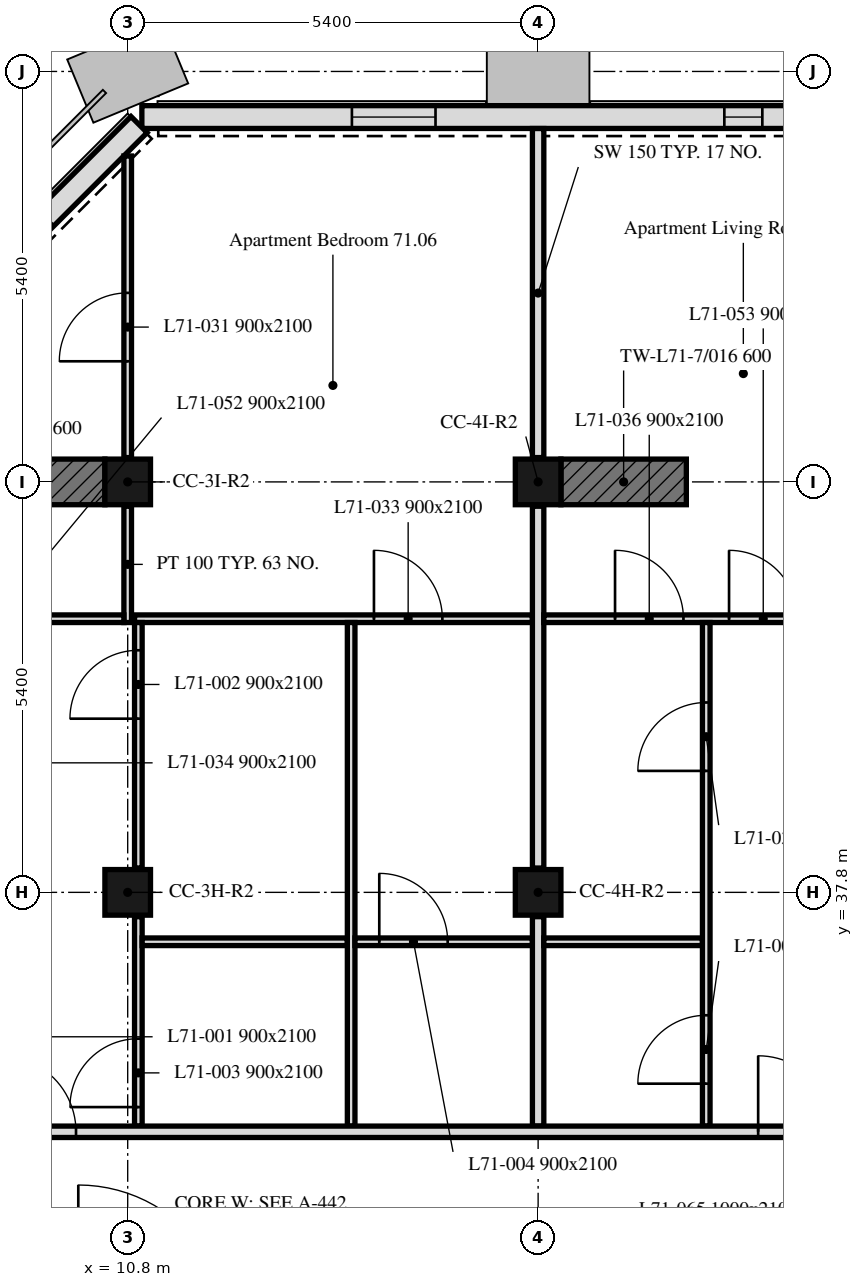
"""IFC4 building model, lengths in metres.
Left out: names, types, materials, properties, quantities, classifications, styles, units other than length and angle.
Written with IfcOpenShell. Run it as: python <this file> out.ifc"""

import sys

from ifc_helpers import new_model, si_unit, direction, frame, frame_2d, origin, origin_2d, place, context, subcontext, project, spatial, rectangle, extrude, element, fill, save


model = new_model("IFC4")
c1 = context("Model", 3, precision=1e-05, world=origin(), true_north=direction((0.0, 1.0)))
c2 = subcontext(c1, "Body", "Model", "MODEL_VIEW")
j1 = project(units=[si_unit("LENGTHUNIT", "METRE"), si_unit("PLANEANGLEUNIT", "RADIAN")], contexts=[c1])
p1 = place(None, origin())
s1 = spatial("IfcSite", under=j1, at=p1, CompositionType="ELEMENT")
p2 = place(p1, origin())
s2 = spatial("IfcBuilding", under=s1, at=p2, CompositionType="ELEMENT")
p3 = place(p2, frame((0.0, 0.0, 288.4)))
s3 = spatial("IfcBuildingStorey", under=s2, at=p3, CompositionType="ELEMENT", Elevation=288.4)
for number, where, z_axis, x_axis in (
    (1, (10.8, 37.8, 0.0), (0.0, 0.0, 1.0), (1.0, 0.0, 0.0)),
    (2, (16.2, 37.8, 0.0), (0.0, 0.0, 1.0), (1.0, 0.0, 0.0)),
    (3, (10.8, 43.2, 0.0), (0.0, 0.0, 1.0), (1.0, 0.0, 0.0)),
    (4, (16.2, 43.2, 0.0), (0.0, 0.0, 1.0), (1.0, 0.0, 0.0)),
):
    element("IfcColumn", number, at=place(p3, frame(where, z_axis=z_axis, x_axis=x_axis)), inside=s3, PredefinedType="COLUMN", context=c2, shape_type="SweptSolid", body=[
        extrude(rectangle(XDim=0.6, YDim=0.6, at=origin_2d()), origin(), (0.0, 0.0, 1.0), 3.0),
    ])
p4 = place(p3, frame((8.7, 43.2, 0.0), z_axis=(0.0, 0.0, 1.0), x_axis=(1.0, 0.0, 0.0)))
e5 = element("IfcWall", 5, at=p4, inside=s3, PredefinedType="SHEAR", context=c2, shape_type="SweptSolid", body=[
    extrude(rectangle(XDim=1.8, YDim=0.6, at=frame_2d((0.9, 0.0))), origin(), (0.0, 0.0, 1.0), 3.0),
])
p5 = place(p3, frame((16.5, 43.2, 0.0), z_axis=(0.0, 0.0, 1.0), x_axis=(1.0, 0.0, 0.0)))
e6 = element("IfcWall", 6, at=p5, inside=s3, PredefinedType="SHEAR", context=c2, shape_type="SweptSolid", body=[
    extrude(rectangle(XDim=1.65, YDim=0.6, at=frame_2d((0.825, 0.0))), origin(), (0.0, 0.0, 1.0), 3.0),
])
p6 = place(p3, frame((43.014, 48.0, 0.0), z_axis=(0.0, 0.0, 1.0), x_axis=(-1.0, 0.0, 0.0)))
e7 = element("IfcWall", 7, at=p6, inside=s3, PredefinedType="SOLIDWALL", context=c2, shape_type="SweptSolid", body=[
    extrude(rectangle(XDim=32.027, YDim=0.3, at=frame_2d((16.014, 0.0))), origin(), (0.0, 0.0, 1.0), 3.0),
])
p7 = place(p6, frame((0.814, 0.0, 0.9)))
e8 = element("IfcOpeningElement", 8, at=p7, cuts=e7, PredefinedType="OPENING", context=c2, shape_type="SweptSolid", body=[
    extrude(rectangle(XDim=3.4, YDim=1.7, at=frame_2d((1.7, 0.85))), frame((0.0, 0.16, 0.0), z_axis=(0.0, -1.0, 0.0), x_axis=(1.0, 0.0, 0.0)), (0.0, 0.0, 1.0), 0.32),
])
p8 = place(p6, frame((7.664, 0.0, 0.9)))
e9 = element("IfcOpeningElement", 9, at=p8, cuts=e7, PredefinedType="OPENING", context=c2, shape_type="SweptSolid", body=[
    extrude(rectangle(XDim=0.5, YDim=1.7, at=frame_2d((0.25, 0.85))), frame((0.0, 0.16, 0.0), z_axis=(0.0, -1.0, 0.0), x_axis=(1.0, 0.0, 0.0)), (0.0, 0.0, 1.0), 0.32),
])
p9 = place(p6, frame((13.064, 0.0, 0.9)))
e10 = element("IfcOpeningElement", 10, at=p9, cuts=e7, PredefinedType="OPENING", context=c2, shape_type="SweptSolid", body=[
    extrude(rectangle(XDim=0.5, YDim=1.7, at=frame_2d((0.25, 0.85))), frame((0.0, 0.16, 0.0), z_axis=(0.0, -1.0, 0.0), x_axis=(1.0, 0.0, 0.0)), (0.0, 0.0, 1.0), 0.32),
])
p10 = place(p6, frame((18.464, 0.0, 0.9)))
e11 = element("IfcOpeningElement", 11, at=p10, cuts=e7, PredefinedType="OPENING", context=c2, shape_type="SweptSolid", body=[
    extrude(rectangle(XDim=0.5, YDim=1.7, at=frame_2d((0.25, 0.85))), frame((0.0, 0.16, 0.0), z_axis=(0.0, -1.0, 0.0), x_axis=(1.0, 0.0, 0.0)), (0.0, 0.0, 1.0), 0.32),
])
p11 = place(p6, frame((23.864, 0.0, 0.9)))
e12 = element("IfcOpeningElement", 12, at=p11, cuts=e7, PredefinedType="OPENING", context=c2, shape_type="SweptSolid", body=[
    extrude(rectangle(XDim=0.5, YDim=1.7, at=frame_2d((0.25, 0.85))), frame((0.0, 0.16, 0.0), z_axis=(0.0, -1.0, 0.0), x_axis=(1.0, 0.0, 0.0)), (0.0, 0.0, 1.0), 0.32),
])
p12 = place(p6, frame((28.164, 0.0, 0.9)))
e13 = element("IfcOpeningElement", 13, at=p12, cuts=e7, PredefinedType="OPENING", context=c2, shape_type="SweptSolid", body=[
    extrude(rectangle(XDim=1.1, YDim=1.7, at=frame_2d((0.55, 0.85))), frame((0.0, 0.16, 0.0), z_axis=(0.0, -1.0, 0.0), x_axis=(1.0, 0.0, 0.0)), (0.0, 0.0, 1.0), 0.32),
])
p13 = place(p3, frame((10.949, 47.901, 0.0), z_axis=(0.0, 0.0, 1.0), x_axis=(-0.707106781187, -0.707106781187, 0.0)))
e14 = element("IfcWall", 14, at=p13, inside=s3, PredefinedType="SOLIDWALL", context=c2, shape_type="SweptSolid", body=[
    extrude(rectangle(XDim=6.86, YDim=0.3, at=frame_2d((3.43, 0.0))), origin(), (0.0, 0.0, 1.0), 3.0),
])
p14 = place(p13, frame((1.73, 0.0, 0.9)))
e15 = element("IfcOpeningElement", 15, at=p14, cuts=e14, PredefinedType="OPENING", context=c2, shape_type="SweptSolid", body=[
    extrude(rectangle(XDim=3.4, YDim=1.7, at=frame_2d((1.7, 0.85))), frame((0.0, 0.16, 0.0), z_axis=(0.0, -1.0, 0.0), x_axis=(1.0, 0.0, 0.0)), (0.0, 0.0, 1.0), 0.32),
])
p15 = place(p3, frame((10.8, 41.35, 0.0), z_axis=(0.0, 0.0, 1.0), x_axis=(0.0, 1.0, 0.0)))
e16 = element("IfcWall", 16, at=p15, inside=s3, PredefinedType="PARTITIONING", context=c2, shape_type="SweptSolid", body=[
    extrude(rectangle(XDim=1.53, YDim=0.1, at=frame_2d((0.765, 0.0))), origin(), (0.0, 0.0, 1.0), 3.0),
])
p16 = place(p3, frame((10.8, 43.52, 0.0), z_axis=(0.0, 0.0, 1.0), x_axis=(0.0, 1.0, 0.0)))
e17 = element("IfcWall", 17, at=p16, inside=s3, PredefinedType="PARTITIONING", context=c2, shape_type="SweptSolid", body=[
    extrude(rectangle(XDim=3.968, YDim=0.1, at=frame_2d((1.984, 0.0))), origin(), (0.0, 0.0, 1.0), 3.0),
])
p17 = place(p16, frame((1.267, 0.0, 0.0)))
e18 = element("IfcOpeningElement", 18, at=p17, cuts=e17, PredefinedType="OPENING", context=c2, shape_type="SweptSolid", body=[
    extrude(rectangle(XDim=0.9, YDim=2.1, at=frame_2d((0.45, 1.05))), frame((0.0, 0.05, 0.0), z_axis=(0.0, -1.0, 0.0), x_axis=(1.0, 0.0, 0.0)), (0.0, 0.0, 1.0), 0.1),
])
p18 = place(p3, frame((6.151, 41.4, 0.0), z_axis=(0.0, 0.0, 1.0), x_axis=(1.0, 0.0, 0.0)))
e19 = element("IfcWall", 19, at=p18, inside=s3, PredefinedType="PARTITIONING", context=c2, shape_type="SweptSolid", body=[
    extrude(rectangle(XDim=4.599, YDim=0.1, at=frame_2d((2.3, 0.0))), origin(), (0.0, 0.0, 1.0), 3.0),
])
p19 = place(p18, frame((1.079, 0.0, 0.0)))
e20 = element("IfcOpeningElement", 20, at=p19, cuts=e19, PredefinedType="OPENING", context=c2, shape_type="SweptSolid", body=[
    extrude(rectangle(XDim=0.9, YDim=2.1, at=frame_2d((0.45, 1.05))), frame((0.0, 0.05, 0.0), z_axis=(0.0, -1.0, 0.0), x_axis=(1.0, 0.0, 0.0)), (0.0, 0.0, 1.0), 0.1),
])
p20 = place(p18, frame((2.449, 0.0, 0.0)))
e21 = element("IfcOpeningElement", 21, at=p20, cuts=e19, PredefinedType="OPENING", context=c2, shape_type="SweptSolid", body=[
    extrude(rectangle(XDim=0.9, YDim=2.1, at=frame_2d((0.45, 1.05))), frame((0.0, 0.05, 0.0), z_axis=(0.0, -1.0, 0.0), x_axis=(1.0, 0.0, 0.0)), (0.0, 0.0, 1.0), 0.1),
])
p21 = place(p3, frame((16.2, 43.52, 0.0), z_axis=(0.0, 0.0, 1.0), x_axis=(0.0, 1.0, 0.0)))
e22 = element("IfcWall", 22, at=p21, inside=s3, PredefinedType="PARTITIONING", context=c2, shape_type="SweptSolid", body=[
    extrude(rectangle(XDim=4.329, YDim=0.15, at=frame_2d((2.165, 0.0))), origin(), (0.0, 0.0, 1.0), 2.4),
])
p22 = place(p3, frame((10.89, 41.4, 0.0), z_axis=(0.0, 0.0, 1.0), x_axis=(1.0, 0.0, 0.0)))
e23 = element("IfcWall", 23, at=p22, inside=s3, PredefinedType="PARTITIONING", context=c2, shape_type="SweptSolid", body=[
    extrude(rectangle(XDim=5.235, YDim=0.1, at=frame_2d((2.618, 0.0))), origin(), (0.0, 0.0, 1.0), 3.0),
])
p23 = place(p22, frame((3.15, 0.0, 0.0)))
e24 = element("IfcOpeningElement", 24, at=p23, cuts=e23, PredefinedType="OPENING", context=c2, shape_type="SweptSolid", body=[
    extrude(rectangle(XDim=0.9, YDim=2.1, at=frame_2d((0.45, 1.05))), frame((0.0, 0.05, 0.0), z_axis=(0.0, -1.0, 0.0), x_axis=(1.0, 0.0, 0.0)), (0.0, 0.0, 1.0), 0.1),
])
p24 = place(p3, frame((10.94, 34.725, 0.0), z_axis=(0.0, 0.0, 1.0), x_axis=(0.0, 1.0, 0.0)))
e25 = element("IfcWall", 25, at=p24, inside=s3, PredefinedType="PARTITIONING", context=c2, shape_type="SweptSolid", body=[
    extrude(rectangle(XDim=2.755, YDim=0.1, at=frame_2d((1.377, 0.0))), origin(), (0.0, 0.0, 1.0), 3.0),
])
p25 = place(p24, frame((0.25, 0.0, 0.0)))
e26 = element("IfcOpeningElement", 26, at=p25, cuts=e25, PredefinedType="OPENING", context=c2, shape_type="SweptSolid", body=[
    extrude(rectangle(XDim=0.9, YDim=2.1, at=frame_2d((0.45, 1.05))), frame((0.0, 0.05, 0.0), z_axis=(0.0, -1.0, 0.0), x_axis=(1.0, 0.0, 0.0)), (0.0, 0.0, 1.0), 0.1),
])
p26 = place(p3, frame((10.94, 38.12, 0.0), z_axis=(0.0, 0.0, 1.0), x_axis=(0.0, 1.0, 0.0)))
e27 = element("IfcWall", 27, at=p26, inside=s3, PredefinedType="PARTITIONING", context=c2, shape_type="SweptSolid", body=[
    extrude(rectangle(XDim=3.23, YDim=0.1, at=frame_2d((1.615, 0.0))), origin(), (0.0, 0.0, 1.0), 3.0),
])
p27 = place(p26, frame((1.965, 0.0, 0.0)))
e28 = element("IfcOpeningElement", 28, at=p27, cuts=e27, PredefinedType="OPENING", context=c2, shape_type="SweptSolid", body=[
    extrude(rectangle(XDim=0.9, YDim=2.1, at=frame_2d((0.45, 1.05))), frame((0.0, 0.05, 0.0), z_axis=(0.0, -1.0, 0.0), x_axis=(1.0, 0.0, 0.0)), (0.0, 0.0, 1.0), 0.1),
])
p28 = place(p3, frame((10.99, 37.15, 0.0), z_axis=(0.0, 0.0, 1.0), x_axis=(1.0, 0.0, 0.0)))
e29 = element("IfcWall", 29, at=p28, inside=s3, PredefinedType="PARTITIONING", context=c2, shape_type="SweptSolid", body=[
    extrude(rectangle(XDim=2.7, YDim=0.1, at=frame_2d((1.35, 0.0))), origin(), (0.0, 0.0, 1.0), 3.0),
])
p29 = place(p3, frame((13.74, 34.725, 0.0), z_axis=(0.0, 0.0, 1.0), x_axis=(0.0, 1.0, 0.0)))
e30 = element("IfcWall", 30, at=p29, inside=s3, PredefinedType="PARTITIONING", context=c2, shape_type="SweptSolid", body=[
    extrude(rectangle(XDim=6.625, YDim=0.1, at=frame_2d((3.312, 0.0))), origin(), (0.0, 0.0, 1.0), 3.0),
])
p30 = place(p3, frame((16.2, 38.12, 0.0), z_axis=(0.0, 0.0, 1.0), x_axis=(0.0, 1.0, 0.0)))
e31 = element("IfcWall", 31, at=p30, inside=s3, PredefinedType="PARTITIONING", context=c2, shape_type="SweptSolid", body=[
    extrude(rectangle(XDim=4.76, YDim=0.15, at=frame_2d((2.38, 0.0))), origin(), (0.0, 0.0, 1.0), 2.4),
])
p31 = place(p3, frame((13.79, 37.15, 0.0), z_axis=(0.0, 0.0, 1.0), x_axis=(1.0, 0.0, 0.0)))
e32 = element("IfcWall", 32, at=p31, inside=s3, PredefinedType="PARTITIONING", context=c2, shape_type="SweptSolid", body=[
    extrude(rectangle(XDim=2.335, YDim=0.1, at=frame_2d((1.167, 0.0))), origin(), (0.0, 0.0, 1.0), 3.0),
])
p32 = place(p31, frame((0.32, 0.0, 0.0)))
e33 = element("IfcOpeningElement", 33, at=p32, cuts=e32, PredefinedType="OPENING", context=c2, shape_type="SweptSolid", body=[
    extrude(rectangle(XDim=0.9, YDim=2.1, at=frame_2d((0.45, 1.05))), frame((0.0, 0.05, 0.0), z_axis=(0.0, -1.0, 0.0), x_axis=(1.0, 0.0, 0.0)), (0.0, 0.0, 1.0), 0.1),
])
p33 = place(p3, frame((16.2, 34.725, 0.0), z_axis=(0.0, 0.0, 1.0), x_axis=(0.0, 1.0, 0.0)))
e34 = element("IfcWall", 34, at=p33, inside=s3, PredefinedType="PARTITIONING", context=c2, shape_type="SweptSolid", body=[
    extrude(rectangle(XDim=2.755, YDim=0.15, at=frame_2d((1.377, 0.0))), origin(), (0.0, 0.0, 1.0), 2.4),
])
p34 = place(p3, frame((16.275, 41.4, 0.0), z_axis=(0.0, 0.0, 1.0), x_axis=(1.0, 0.0, 0.0)))
e35 = element("IfcWall", 35, at=p34, inside=s3, PredefinedType="PARTITIONING", context=c2, shape_type="SweptSolid", body=[
    extrude(rectangle(XDim=10.65, YDim=0.1, at=frame_2d((5.325, 0.0))), origin(), (0.0, 0.0, 1.0), 2.4),
])
p35 = place(p34, frame((0.937, 0.0, 0.0)))
e36 = element("IfcOpeningElement", 36, at=p35, cuts=e35, PredefinedType="OPENING", context=c2, shape_type="SweptSolid", body=[
    extrude(rectangle(XDim=0.9, YDim=2.1, at=frame_2d((0.45, 1.05))), frame((0.0, 0.05, 0.0), z_axis=(0.0, -1.0, 0.0), x_axis=(1.0, 0.0, 0.0)), (0.0, 0.0, 1.0), 0.1),
])
p36 = place(p34, frame((8.075, 0.0, 0.0)))
e37 = element("IfcOpeningElement", 37, at=p36, cuts=e35, PredefinedType="OPENING", context=c2, shape_type="SweptSolid", body=[
    extrude(rectangle(XDim=0.9, YDim=2.1, at=frame_2d((0.45, 1.05))), frame((0.0, 0.05, 0.0), z_axis=(0.0, -1.0, 0.0), x_axis=(1.0, 0.0, 0.0)), (0.0, 0.0, 1.0), 0.1),
])
p37 = place(p34, frame((2.437, 0.0, 0.0)))
e38 = element("IfcOpeningElement", 38, at=p37, cuts=e35, PredefinedType="OPENING", context=c2, shape_type="SweptSolid", body=[
    extrude(rectangle(XDim=0.9, YDim=2.1, at=frame_2d((0.45, 1.05))), frame((0.0, 0.05, 0.0), z_axis=(0.0, -1.0, 0.0), x_axis=(1.0, 0.0, 0.0)), (0.0, 0.0, 1.0), 0.1),
])
p38 = place(p3, frame((16.275, 37.15, 0.0), z_axis=(0.0, 0.0, 1.0), x_axis=(1.0, 0.0, 0.0)))
e39 = element("IfcWall", 39, at=p38, inside=s3, PredefinedType="PARTITIONING", context=c2, shape_type="SweptSolid", body=[
    extrude(rectangle(XDim=2.087, YDim=0.1, at=frame_2d((1.043, 0.0))), origin(), (0.0, 0.0, 1.0), 3.0),
])
p39 = place(p3, frame((18.412, 34.725, 0.0), z_axis=(0.0, 0.0, 1.0), x_axis=(0.0, 1.0, 0.0)))
e40 = element("IfcWall", 40, at=p39, inside=s3, PredefinedType="PARTITIONING", context=c2, shape_type="SweptSolid", body=[
    extrude(rectangle(XDim=6.625, YDim=0.1, at=frame_2d((3.312, 0.0))), origin(), (0.0, 0.0, 1.0), 3.0),
])
p40 = place(p39, frame((0.558, 0.0, 0.0)))
e41 = element("IfcOpeningElement", 41, at=p40, cuts=e40, PredefinedType="OPENING", context=c2, shape_type="SweptSolid", body=[
    extrude(rectangle(XDim=0.9, YDim=2.1, at=frame_2d((0.45, 1.05))), frame((0.0, 0.05, 0.0), z_axis=(0.0, -1.0, 0.0), x_axis=(1.0, 0.0, 0.0)), (0.0, 0.0, 1.0), 0.1),
])
p41 = place(p39, frame((4.673, 0.0, 0.0)))
e42 = element("IfcOpeningElement", 42, at=p41, cuts=e40, PredefinedType="OPENING", context=c2, shape_type="SweptSolid", body=[
    extrude(rectangle(XDim=0.9, YDim=2.1, at=frame_2d((0.45, 1.05))), frame((0.0, 0.05, 0.0), z_axis=(0.0, -1.0, 0.0), x_axis=(1.0, 0.0, 0.0)), (0.0, 0.0, 1.0), 0.1),
])
p42 = place(p3, frame((6.151, 34.65, 0.0), z_axis=(0.0, 0.0, 1.0), x_axis=(1.0, 0.0, 0.0)))
e43 = element("IfcWall", 43, at=p42, inside=s3, PredefinedType="PARTITIONING", context=c2, shape_type="SweptSolid", body=[
    extrude(rectangle(XDim=41.698, YDim=0.15, at=frame_2d((20.849, 0.0))), origin(), (0.0, 0.0, 1.0), 2.4),
])
p43 = place(p42, frame((2.969, 0.0, 0.0)))
e44 = element("IfcOpeningElement", 44, at=p43, cuts=e43, PredefinedType="OPENING", context=c2, shape_type="SweptSolid", body=[
    extrude(rectangle(XDim=1.0, YDim=2.1, at=frame_2d((0.5, 1.05))), frame((0.0, 0.075, 0.0), z_axis=(0.0, -1.0, 0.0), x_axis=(1.0, 0.0, 0.0)), (0.0, 0.0, 1.0), 0.15),
])
p44 = place(p42, frame((12.944, 0.0, 0.0)))
e45 = element("IfcOpeningElement", 45, at=p44, cuts=e43, PredefinedType="OPENING", context=c2, shape_type="SweptSolid", body=[
    extrude(rectangle(XDim=1.0, YDim=2.1, at=frame_2d((0.5, 1.05))), frame((0.0, 0.075, 0.0), z_axis=(0.0, -1.0, 0.0), x_axis=(1.0, 0.0, 0.0)), (0.0, 0.0, 1.0), 0.15),
])
p45 = place(p42, frame((24.444, 0.0, 0.0)))
e46 = element("IfcOpeningElement", 46, at=p45, cuts=e43, PredefinedType="OPENING", context=c2, shape_type="SweptSolid", body=[
    extrude(rectangle(XDim=1.0, YDim=2.1, at=frame_2d((0.5, 1.05))), frame((0.0, 0.075, 0.0), z_axis=(0.0, -1.0, 0.0), x_axis=(1.0, 0.0, 0.0)), (0.0, 0.0, 1.0), 0.15),
])
p46 = place(p42, frame((34.964, 0.0, 0.0)))
e47 = element("IfcOpeningElement", 47, at=p46, cuts=e43, PredefinedType="OPENING", context=c2, shape_type="SweptSolid", body=[
    extrude(rectangle(XDim=1.0, YDim=2.1, at=frame_2d((0.5, 1.05))), frame((0.0, 0.075, 0.0), z_axis=(0.0, -1.0, 0.0), x_axis=(1.0, 0.0, 0.0)), (0.0, 0.0, 1.0), 0.15),
])
p47 = place(p11, origin())
e48 = element("IfcWindow", 48, at=p47, inside=s3, PartitioningType="SINGLE_PANEL", PredefinedType="WINDOW", context=c2, shape_type="SweptSolid", body=[
    extrude(rectangle(XDim=0.5, YDim=1.7, at=frame_2d((0.25, 0.85))), frame((0.0, 0.03, 0.0), z_axis=(0.0, -1.0, 0.0), x_axis=(1.0, 0.0, 0.0)), (0.0, 0.0, 1.0), 0.06),
])
fill(e12, e48)
p48 = place(p12, origin())
e49 = element("IfcWindow", 49, at=p48, inside=s3, PartitioningType="SINGLE_PANEL", PredefinedType="WINDOW", context=c2, shape_type="SweptSolid", body=[
    extrude(rectangle(XDim=1.1, YDim=1.7, at=frame_2d((0.55, 0.85))), frame((0.0, 0.03, 0.0), z_axis=(0.0, -1.0, 0.0), x_axis=(1.0, 0.0, 0.0)), (0.0, 0.0, 1.0), 0.06),
])
fill(e13, e49)
p49 = place(p27, origin())
e50 = element("IfcDoor", 50, at=p49, inside=s3, OperationType="SINGLE_SWING_RIGHT", PredefinedType="DOOR", context=c2, shape_type="SweptSolid", body=[
    extrude(rectangle(XDim=0.9, YDim=2.1, at=frame_2d((0.45, 1.05))), frame((0.0, 0.025, 0.0), z_axis=(0.0, -1.0, 0.0), x_axis=(1.0, 0.0, 0.0)), (0.0, 0.0, 1.0), 0.05),
])
fill(e28, e50)
p50 = place(p25, origin())
e51 = element("IfcDoor", 51, at=p50, inside=s3, OperationType="SINGLE_SWING_RIGHT", PredefinedType="DOOR", context=c2, shape_type="SweptSolid", body=[
    extrude(rectangle(XDim=0.9, YDim=2.1, at=frame_2d((0.45, 1.05))), frame((0.0, 0.025, 0.0), z_axis=(0.0, -1.0, 0.0), x_axis=(1.0, 0.0, 0.0)), (0.0, 0.0, 1.0), 0.05),
])
fill(e26, e51)
p51 = place(p32, origin())
e52 = element("IfcDoor", 52, at=p51, inside=s3, OperationType="SINGLE_SWING_RIGHT", PredefinedType="DOOR", context=c2, shape_type="SweptSolid", body=[
    extrude(rectangle(XDim=0.9, YDim=2.1, at=frame_2d((0.45, 1.05))), frame((0.0, 0.025, 0.0), z_axis=(0.0, -1.0, 0.0), x_axis=(1.0, 0.0, 0.0)), (0.0, 0.0, 1.0), 0.05),
])
fill(e33, e52)
p52 = place(p40, origin())
e53 = element("IfcDoor", 53, at=p52, inside=s3, OperationType="SINGLE_SWING_RIGHT", PredefinedType="DOOR", context=c2, shape_type="SweptSolid", body=[
    extrude(rectangle(XDim=0.9, YDim=2.1, at=frame_2d((0.45, 1.05))), frame((0.0, 0.025, 0.0), z_axis=(0.0, -1.0, 0.0), x_axis=(1.0, 0.0, 0.0)), (0.0, 0.0, 1.0), 0.05),
])
fill(e41, e53)
p53 = place(p17, origin())
e54 = element("IfcDoor", 54, at=p53, inside=s3, OperationType="SINGLE_SWING_RIGHT", PredefinedType="DOOR", context=c2, shape_type="SweptSolid", body=[
    extrude(rectangle(XDim=0.9, YDim=2.1, at=frame_2d((0.45, 1.05))), frame((0.0, 0.025, 0.0), z_axis=(0.0, -1.0, 0.0), x_axis=(1.0, 0.0, 0.0)), (0.0, 0.0, 1.0), 0.05),
])
fill(e18, e54)
p54 = place(p23, origin())
e55 = element("IfcDoor", 55, at=p54, inside=s3, OperationType="SINGLE_SWING_LEFT", PredefinedType="DOOR", context=c2, shape_type="SweptSolid", body=[
    extrude(rectangle(XDim=0.9, YDim=2.1, at=frame_2d((0.45, 1.05))), frame((0.0, 0.025, 0.0), z_axis=(0.0, -1.0, 0.0), x_axis=(1.0, 0.0, 0.0)), (0.0, 0.0, 1.0), 0.05),
])
fill(e24, e55)
p55 = place(p35, origin())
e56 = element("IfcDoor", 56, at=p55, inside=s3, OperationType="SINGLE_SWING_RIGHT", PredefinedType="DOOR", context=c2, shape_type="SweptSolid", body=[
    extrude(rectangle(XDim=0.9, YDim=2.1, at=frame_2d((0.45, 1.05))), frame((0.0, 0.025, 0.0), z_axis=(0.0, -1.0, 0.0), x_axis=(1.0, 0.0, 0.0)), (0.0, 0.0, 1.0), 0.05),
])
fill(e36, e56)
p56 = place(p41, origin())
e57 = element("IfcDoor", 57, at=p56, inside=s3, OperationType="SINGLE_SWING_LEFT", PredefinedType="DOOR", context=c2, shape_type="SweptSolid", body=[
    extrude(rectangle(XDim=0.9, YDim=2.1, at=frame_2d((0.45, 1.05))), frame((0.0, 0.025, 0.0), z_axis=(0.0, -1.0, 0.0), x_axis=(1.0, 0.0, 0.0)), (0.0, 0.0, 1.0), 0.05),
])
fill(e42, e57)
p57 = place(p37, origin())
e58 = element("IfcDoor", 58, at=p57, inside=s3, OperationType="SINGLE_SWING_LEFT", PredefinedType="DOOR", context=c2, shape_type="SweptSolid", body=[
    extrude(rectangle(XDim=0.9, YDim=2.1, at=frame_2d((0.45, 1.05))), frame((0.0, 0.025, 0.0), z_axis=(0.0, -1.0, 0.0), x_axis=(1.0, 0.0, 0.0)), (0.0, 0.0, 1.0), 0.05),
])
fill(e38, e58)
p58 = place(p43, origin())
e59 = element("IfcDoor", 59, at=p58, inside=s3, OperationType="SINGLE_SWING_RIGHT", PredefinedType="DOOR", context=c2, shape_type="SweptSolid", body=[
    extrude(rectangle(XDim=1.0, YDim=2.1, at=frame_2d((0.5, 1.05))), frame((0.0, 0.025, 0.0), z_axis=(0.0, -1.0, 0.0), x_axis=(1.0, 0.0, 0.0)), (0.0, 0.0, 1.0), 0.05),
])
fill(e44, e59)
p59 = place(p44, origin())
e60 = element("IfcDoor", 60, at=p59, inside=s3, OperationType="SINGLE_SWING_RIGHT", PredefinedType="DOOR", context=c2, shape_type="SweptSolid", body=[
    extrude(rectangle(XDim=1.0, YDim=2.1, at=frame_2d((0.5, 1.05))), frame((0.0, 0.025, 0.0), z_axis=(0.0, -1.0, 0.0), x_axis=(1.0, 0.0, 0.0)), (0.0, 0.0, 1.0), 0.05),
])
fill(e45, e60)
save(model, sys.argv[1])
